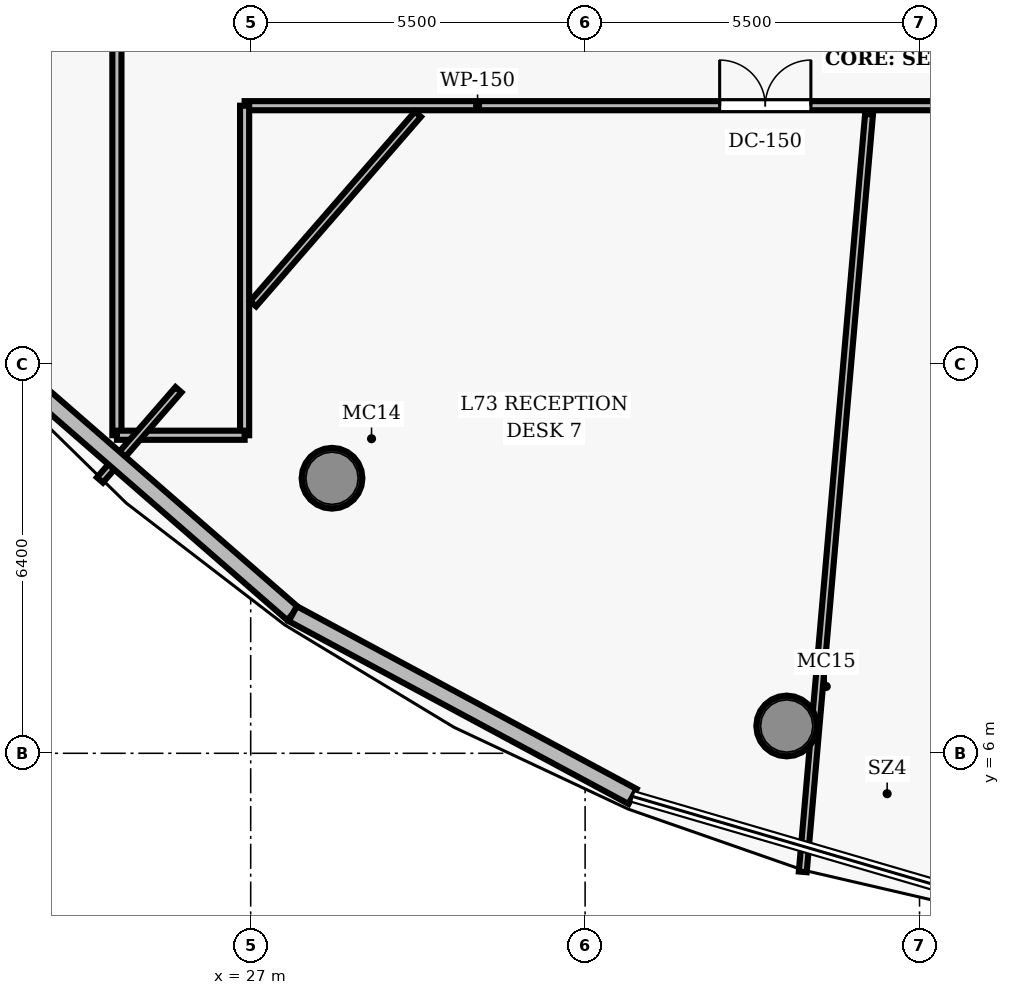
"""IFC4 building model, lengths in metres.
Left out: names, types, materials, properties, quantities, classifications, styles, units other than length and angle.
Written with IfcOpenShell. Run it as: python <this file> out.ifc"""

import sys

from ifc_helpers import new_model, si_unit, direction, frame, frame_2d, origin, origin_2d, place, context, subcontext, project, spatial, rectangle, hollow_circle, extrude, element, fill, save


model = new_model("IFC4")
c1 = context("Model", 3, precision=1e-05, world=origin(), true_north=direction((0.0, 1.0)))
c2 = subcontext(c1, "Body", "Model", "MODEL_VIEW")
j1 = project(units=[si_unit("LENGTHUNIT", "METRE"), si_unit("PLANEANGLEUNIT", "RADIAN")], contexts=[c1])
p1 = place(None, origin())
s1 = spatial("IfcSite", under=j1, at=p1, CompositionType="ELEMENT")
p2 = place(p1, origin())
s2 = spatial("IfcBuilding", under=s1, at=p2, CompositionType="ELEMENT")
p3 = place(p2, frame((0.0, 0.0, 288.25)))
s3 = spatial("IfcBuildingStorey", under=s2, at=p3, CompositionType="ELEMENT", Elevation=288.25)
for number, where, z_axis, x_axis in (
    (1, (28.338, 10.523, 0.0), (0.0, 0.0, 1.0), (1.0, 0.0, 0.0)),
    (2, (35.815, 6.449, 0.0), (0.0, 0.0, 1.0), (1.0, 0.0, 0.0)),
):
    element("IfcColumn", number, at=place(p3, frame(where, z_axis=z_axis, x_axis=x_axis)), inside=s3, PredefinedType="COLUMN", context=c2, shape_type="SweptSolid", body=[
        extrude(hollow_circle(Radius=0.5, WallThickness=0.045, at=origin_2d()), origin(), (0.0, 0.0, 1.0), 3.85),
    ])
p4 = place(p3, frame((26.9, 16.65, 0.0), z_axis=(0.0, 0.0, 1.0), x_axis=(1.0, 0.0, 0.0)))
e3 = element("IfcWall", 3, at=p4, inside=s3, PredefinedType="PARTITIONING", context=c2, shape_type="SweptSolid", body=[
    extrude(rectangle(XDim=22.2, YDim=0.15, at=frame_2d((11.1, 0.0))), origin(), (0.0, 0.0, 1.0), 3.04),
])
p5 = place(p4, frame((7.813, 0.0, 0.0)))
e4 = element("IfcOpeningElement", 4, at=p5, cuts=e3, PredefinedType="OPENING", context=c2, shape_type="SweptSolid", body=[
    extrude(rectangle(XDim=1.5, YDim=2.2, at=frame_2d((0.75, 1.1))), frame((0.0, 0.085, 0.0), z_axis=(0.0, -1.0, 0.0), x_axis=(1.0, 0.0, 0.0)), (0.0, 0.0, 1.0), 0.17),
])
p6 = place(p4, frame((14.125, 0.0, 0.0)))
e5 = element("IfcOpeningElement", 5, at=p6, cuts=e3, PredefinedType="OPENING", context=c2, shape_type="SweptSolid", body=[
    extrude(rectangle(XDim=0.95, YDim=2.15, at=frame_2d((0.475, 1.075))), frame((0.0, 0.085, 0.0), z_axis=(0.0, -1.0, 0.0), x_axis=(1.0, 0.0, 0.0)), (0.0, 0.0, 1.0), 0.17),
])
p7 = place(p4, frame((17.741, 0.0, 0.0)))
e6 = element("IfcOpeningElement", 6, at=p7, cuts=e3, PredefinedType="OPENING", context=c2, shape_type="SweptSolid", body=[
    extrude(rectangle(XDim=1.5, YDim=2.2, at=frame_2d((0.75, 1.1))), frame((0.0, 0.085, 0.0), z_axis=(0.0, -1.0, 0.0), x_axis=(1.0, 0.0, 0.0)), (0.0, 0.0, 1.0), 0.17),
])
p8 = place(p3, frame((24.8, 11.23, 0.0), z_axis=(0.0, 0.0, 1.0), x_axis=(0.0, 1.0, 0.0)))
e7 = element("IfcWall", 7, at=p8, inside=s3, PredefinedType="PARTITIONING", context=c2, shape_type="SweptSolid", body=[
    extrude(rectangle(XDim=30.17, YDim=0.15, at=frame_2d((15.085, 0.0))), origin(), (0.0, 0.0, 1.0), 3.04),
])
p9 = place(p8, frame((17.915, 0.0, 0.0)))
e8 = element("IfcOpeningElement", 8, at=p9, cuts=e7, PredefinedType="OPENING", context=c2, shape_type="SweptSolid", body=[
    extrude(rectangle(XDim=0.95, YDim=2.15, at=frame_2d((0.475, 1.075))), frame((0.0, 0.085, 0.0), z_axis=(0.0, -1.0, 0.0), x_axis=(1.0, 0.0, 0.0)), (0.0, 0.0, 1.0), 0.17),
])
p10 = place(p8, frame((8.518, 0.0, 0.0)))
e9 = element("IfcOpeningElement", 9, at=p10, cuts=e7, PredefinedType="OPENING", context=c2, shape_type="SweptSolid", body=[
    extrude(rectangle(XDim=0.95, YDim=2.15, at=frame_2d((0.475, 1.075))), frame((0.0, 0.085, 0.0), z_axis=(0.0, -1.0, 0.0), x_axis=(1.0, 0.0, 0.0)), (0.0, 0.0, 1.0), 0.17),
])
p11 = place(p3, frame((26.9, 11.23, 0.0), z_axis=(0.0, 0.0, 1.0), x_axis=(0.0, 1.0, 0.0)))
e10 = element("IfcWall", 10, at=p11, inside=s3, PredefinedType="PARTITIONING", context=c2, shape_type="SweptSolid", body=[
    extrude(rectangle(XDim=5.42, YDim=0.15, at=frame_2d((2.71, 0.0))), origin(), (0.0, 0.0, 1.0), 3.04),
])
p12 = place(p3, frame((24.8, 11.23, 0.0), z_axis=(0.0, 0.0, 1.0), x_axis=(1.0, 0.0, 0.0)))
e11 = element("IfcWall", 11, at=p12, inside=s3, PredefinedType="PARTITIONING", context=c2, shape_type="SweptSolid", body=[
    extrude(rectangle(XDim=2.1, YDim=0.15, at=frame_2d((1.05, 0.0))), origin(), (0.0, 0.0, 1.0), 3.04),
])
p13 = place(p3, frame((29.75, 16.51, 0.0), z_axis=(0.0, 0.0, 1.0), x_axis=(-0.656070441922, -0.754699658961, 0.0)))
e12 = element("IfcWall", 12, at=p13, inside=s3, PredefinedType="PARTITIONING", context=c2, shape_type="SweptSolid", body=[
    extrude(rectangle(XDim=4.131, YDim=0.13, at=frame_2d((2.066, 0.0))), origin(), (0.0, 0.0, 1.0), 3.04),
])
p14 = place(p3, frame((25.812, 11.979, 0.0), z_axis=(0.0, 0.0, 1.0), x_axis=(-0.656138786001, -0.754640241112, 0.0)))
e13 = element("IfcWall", 13, at=p14, inside=s3, PredefinedType="PARTITIONING", context=c2, shape_type="SweptSolid", body=[
    extrude(rectangle(XDim=1.968, YDim=0.13, at=frame_2d((0.984, 0.0))), origin(), (0.0, 0.0, 1.0), 3.04),
])
p15 = place(p3, frame((37.17, 16.51, 0.0), z_axis=(0.0, 0.0, 1.0), x_axis=(-0.087154359031, -0.99619481915, 0.0)))
e14 = element("IfcWall", 14, at=p15, inside=s3, PredefinedType="PARTITIONING", context=c2, shape_type="SweptSolid", body=[
    extrude(rectangle(XDim=12.508, YDim=0.13, at=frame_2d((6.254, 0.0))), origin(), (0.0, 0.0, 1.0), 3.04),
])
p16 = place(p3, frame((27.693, 8.295, 0.0), z_axis=(0.0, 0.0, 1.0), x_axis=(-0.75420350535, 0.656640748445, 0.0)))
e15 = element("IfcWall", 15, at=p16, inside=s3, PredefinedType="SOLIDWALL", context=c2, shape_type="SweptSolid", body=[
    extrude(rectangle(XDim=6.526, YDim=0.28, at=frame_2d((3.263, 0.0))), origin(), (0.0, 0.0, 1.0), 3.625),
])
p17 = place(p3, frame((33.281, 5.29, 0.0), z_axis=(0.0, 0.0, 1.0), x_axis=(-0.8807180746, 0.473640869302, 0.0)))
e16 = element("IfcWall", 16, at=p17, inside=s3, PredefinedType="SOLIDWALL", context=c2, shape_type="SweptSolid", body=[
    extrude(rectangle(XDim=6.345, YDim=0.28, at=frame_2d((3.173, 0.0))), origin(), (0.0, 0.0, 1.0), 3.625),
])
p18 = place(p5, origin())
e17 = element("IfcDoor", 17, at=p18, inside=s3, OperationType="DOUBLE_DOOR_SINGLE_SWING", PredefinedType="DOOR", context=c2, shape_type="SweptSolid", body=[
    extrude(rectangle(XDim=1.5, YDim=2.2, at=frame_2d((0.75, 1.1))), frame((0.0, 0.025, 0.0), z_axis=(0.0, -1.0, 0.0), x_axis=(1.0, 0.0, 0.0)), (0.0, 0.0, 1.0), 0.05),
])
fill(e4, e17)
save(model, sys.argv[1])
